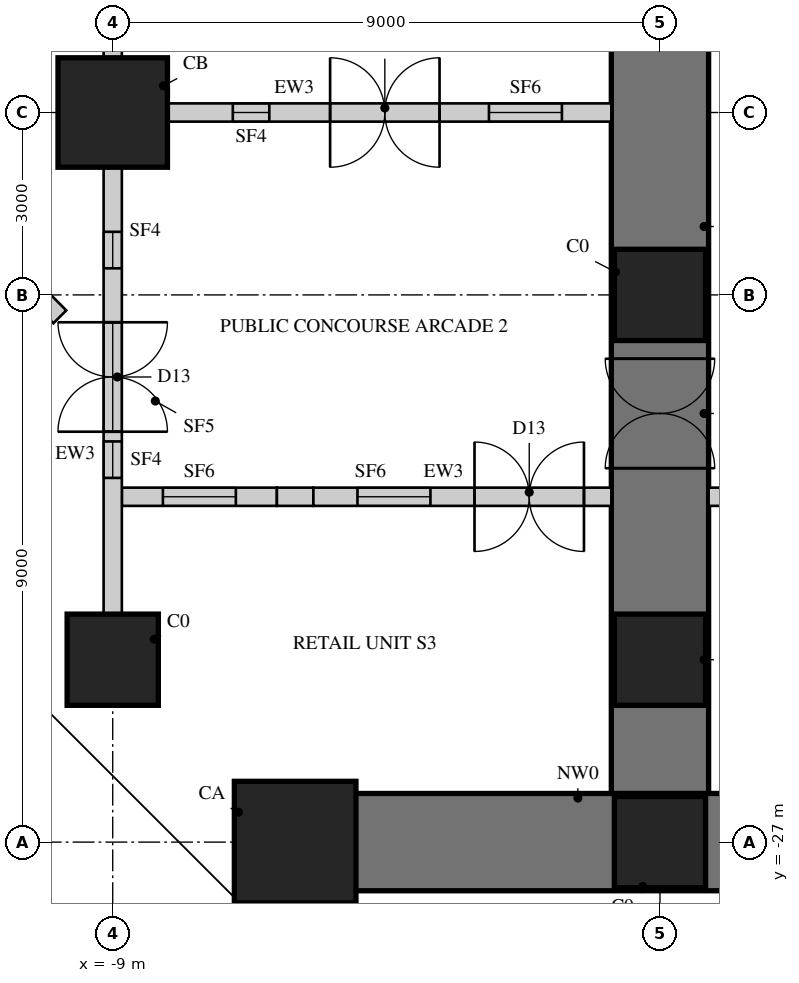
"""IFC4 building model, lengths in metres.
Left out: names, types, materials, properties, quantities, classifications, styles, units other than length and angle.
Written with IfcOpenShell. Run it as: python <this file> out.ifc"""

import sys

from ifc_helpers import new_model, si_unit, direction, frame, frame_2d, origin, origin_2d, place, context, subcontext, project, spatial, rectangle, hollow_rectangle, extrude, element, fill, save


model = new_model("IFC4")
c1 = context("Model", 3, precision=1e-05, world=origin(), true_north=direction((0.0, 1.0)))
c2 = subcontext(c1, "Body", "Model", "MODEL_VIEW")
j1 = project(units=[si_unit("LENGTHUNIT", "METRE"), si_unit("PLANEANGLEUNIT", "RADIAN")], contexts=[c1])
p1 = place(None, origin())
s1 = spatial("IfcSite", under=j1, at=p1, CompositionType="ELEMENT")
p2 = place(p1, origin())
s2 = spatial("IfcBuilding", under=s1, at=p2, CompositionType="ELEMENT")
p3 = place(p2, origin())
s3 = spatial("IfcBuildingStorey", under=s2, at=p3, CompositionType="ELEMENT", Elevation=0.0)
p4 = place(p3, frame((0.0, -9.0, 0.0), z_axis=(0.0, 0.0, 1.0), x_axis=(0.0, -1.0, 0.0)))
e1 = element("IfcWall", 1, at=p4, inside=s3, PredefinedType="SHEAR", context=c2, shape_type="SweptSolid", body=[
    extrude(rectangle(XDim=18.0, YDim=1.6, at=frame_2d((9.0, 0.0))), origin(), (0.0, 0.0, 1.0), 5.0),
])
p5 = place(p4, frame((10.05, 0.0, 0.0)))
e2 = element("IfcOpeningElement", 2, at=p5, cuts=e1, PredefinedType="OPENING", context=c2, shape_type="SweptSolid", body=[
    extrude(rectangle(XDim=1.8, YDim=2.4, at=frame_2d((0.9, 1.2))), frame((0.0, 0.81, 0.0), z_axis=(0.0, -1.0, 0.0), x_axis=(1.0, 0.0, 0.0)), (0.0, 0.0, 1.0), 1.62),
])
p6 = place(p3, frame((-6.0, -27.0, 0.0), z_axis=(0.0, 0.0, 1.0), x_axis=(1.0, 0.0, 0.0)))
e3 = element("IfcWall", 3, at=p6, inside=s3, PredefinedType="SHEAR", context=c2, shape_type="SweptSolid", body=[
    extrude(rectangle(XDim=12.0, YDim=1.6, at=frame_2d((6.0, 0.0))), origin(), (0.0, 0.0, 1.0), 5.0),
])
p7 = place(p3, frame((-9.0, -15.0, 0.0), z_axis=(0.0, 0.0, 1.0), x_axis=(1.0, 0.0, 0.0)))
e4 = element("IfcColumn", 4, at=p7, inside=s3, PredefinedType="COLUMN", context=c2, shape_type="SweptSolid", body=[
    extrude(rectangle(XDim=1.8, YDim=1.8, at=origin_2d()), origin(), (0.0, 0.0, 1.0), 5.0),
])
p8 = place(p3, frame((-9.0, -24.0, 0.0), z_axis=(0.0, 0.0, 1.0), x_axis=(1.0, 0.0, 0.0)))
e5 = element("IfcColumn", 5, at=p8, inside=s3, PredefinedType="COLUMN", context=c2, shape_type="SweptSolid", body=[
    extrude(rectangle(XDim=1.5, YDim=1.5, at=origin_2d()), origin(), (0.0, 0.0, 1.0), 5.0),
])
p9 = place(p3, frame((-6.0, -27.0, 0.0), z_axis=(0.0, 0.0, 1.0), x_axis=(1.0, 0.0, 0.0)))
e6 = element("IfcColumn", 6, at=p9, inside=s3, PredefinedType="COLUMN", context=c2, shape_type="SweptSolid", body=[
    extrude(rectangle(XDim=2.0, YDim=2.0, at=origin_2d()), origin(), (0.0, 0.0, 1.0), 5.0),
])
for number, where, z_axis, x_axis in (
    (7, (0.0, -27.0, 0.0), (0.0, 0.0, 1.0), (1.0, 0.0, 0.0)),
    (8, (0.0, -18.0, 0.0), (0.0, 0.0, 1.0), (1.0, 0.0, 0.0)),
    (9, (0.0, -24.0, 0.0), (0.0, 0.0, 1.0), (1.0, 0.0, 0.0)),
):
    element("IfcColumn", number, at=place(p3, frame(where, z_axis=z_axis, x_axis=x_axis)), inside=s3, PredefinedType="COLUMN", context=c2, shape_type="SweptSolid", body=[
        extrude(rectangle(XDim=1.5, YDim=1.5, at=origin_2d()), origin(), (0.0, 0.0, 1.0), 5.0),
    ])
p10 = place(p3, frame((-18.36, -9.87, 0.0), z_axis=(0.0, 0.0, 1.0), x_axis=(0.707106781187, -0.707106781187, 0.0)))
e10 = element("IfcWall", 10, at=p10, inside=s3, PredefinedType="SOLIDWALL", context=c2, shape_type="SweptSolid", body=[
    extrude(rectangle(XDim=12.007, YDim=0.3, at=frame_2d((6.003, 0.0))), origin(), (0.0, 0.0, 1.0), 4.8),
])
p11 = place(p10, frame((1.034, 0.0, 0.3)))
e11 = element("IfcOpeningElement", 11, at=p11, cuts=e10, PredefinedType="OPENING", context=c2, shape_type="SweptSolid", body=[
    extrude(rectangle(XDim=3.6, YDim=3.9, at=frame_2d((1.8, 1.95))), frame((0.0, 0.16, 0.0), z_axis=(0.0, -1.0, 0.0), x_axis=(1.0, 0.0, 0.0)), (0.0, 0.0, 1.0), 0.32),
])
p12 = place(p10, frame((8.523, 0.0, 0.3)))
e12 = element("IfcOpeningElement", 12, at=p12, cuts=e10, PredefinedType="OPENING", context=c2, shape_type="SweptSolid", body=[
    extrude(rectangle(XDim=2.4, YDim=3.9, at=frame_2d((1.2, 1.95))), frame((0.0, 0.16, 0.0), z_axis=(0.0, -1.0, 0.0), x_axis=(1.0, 0.0, 0.0)), (0.0, 0.0, 1.0), 0.32),
])
p13 = place(p3, frame((-8.25, -15.0, 0.0), z_axis=(0.0, 0.0, 1.0), x_axis=(1.0, 0.0, 0.0)))
e13 = element("IfcWall", 13, at=p13, inside=s3, PredefinedType="SOLIDWALL", context=c2, shape_type="SweptSolid", body=[
    extrude(rectangle(XDim=7.45, YDim=0.3, at=frame_2d((3.725, 0.0))), origin(), (0.0, 0.0, 1.0), 3.85),
])
p14 = place(p13, frame((2.825, 0.0, 0.0)))
e14 = element("IfcOpeningElement", 14, at=p14, cuts=e13, PredefinedType="OPENING", context=c2, shape_type="SweptSolid", body=[
    extrude(rectangle(XDim=1.8, YDim=2.4, at=frame_2d((0.9, 1.2))), frame((0.0, 0.16, 0.0), z_axis=(0.0, -1.0, 0.0), x_axis=(1.0, 0.0, 0.0)), (0.0, 0.0, 1.0), 0.32),
])
p15 = place(p13, frame((1.225, 0.0, 0.3)))
e15 = element("IfcOpeningElement", 15, at=p15, cuts=e13, PredefinedType="OPENING", context=c2, shape_type="SweptSolid", body=[
    extrude(rectangle(XDim=0.6, YDim=3.4, at=frame_2d((0.3, 1.7))), frame((0.0, 0.16, 0.0), z_axis=(0.0, -1.0, 0.0), x_axis=(1.0, 0.0, 0.0)), (0.0, 0.0, 1.0), 0.32),
])
p16 = place(p13, frame((5.438, 0.0, 0.3)))
e16 = element("IfcOpeningElement", 16, at=p16, cuts=e13, PredefinedType="OPENING", context=c2, shape_type="SweptSolid", body=[
    extrude(rectangle(XDim=1.2, YDim=3.4, at=frame_2d((0.6, 1.7))), frame((0.0, 0.16, 0.0), z_axis=(0.0, -1.0, 0.0), x_axis=(1.0, 0.0, 0.0)), (0.0, 0.0, 1.0), 0.32),
])
p17 = place(p3, frame((0.8, -21.32, 0.0), z_axis=(0.0, 0.0, 1.0), x_axis=(1.0, 0.0, 0.0)))
e17 = element("IfcWall", 17, at=p17, inside=s3, PredefinedType="SOLIDWALL", context=c2, shape_type="SweptSolid", body=[
    extrude(rectangle(XDim=4.9, YDim=0.3, at=frame_2d((2.45, 0.0))), origin(), (0.0, 0.0, 1.0), 3.85),
])
p18 = place(p17, frame((0.45, 0.0, 0.0)))
e18 = element("IfcOpeningElement", 18, at=p18, cuts=e17, PredefinedType="OPENING", context=c2, shape_type="SweptSolid", body=[
    extrude(rectangle(XDim=1.8, YDim=2.4, at=frame_2d((0.9, 1.2))), frame((0.0, 0.16, 0.0), z_axis=(0.0, -1.0, 0.0), x_axis=(1.0, 0.0, 0.0)), (0.0, 0.0, 1.0), 0.32),
])
p19 = place(p17, frame((2.975, 0.0, 0.3)))
e19 = element("IfcOpeningElement", 19, at=p19, cuts=e17, PredefinedType="OPENING", context=c2, shape_type="SweptSolid", body=[
    extrude(rectangle(XDim=1.2, YDim=3.4, at=frame_2d((0.6, 1.7))), frame((0.0, 0.16, 0.0), z_axis=(0.0, -1.0, 0.0), x_axis=(1.0, 0.0, 0.0)), (0.0, 0.0, 1.0), 0.32),
])
p20 = place(p3, frame((-8.85, -21.32, 0.0), z_axis=(0.0, 0.0, 1.0), x_axis=(1.0, 0.0, 0.0)))
e20 = element("IfcWall", 20, at=p20, inside=s3, PredefinedType="SOLIDWALL", context=c2, shape_type="SweptSolid", body=[
    extrude(rectangle(XDim=2.55, YDim=0.3, at=frame_2d((1.275, 0.0))), origin(), (0.0, 0.0, 1.0), 3.85),
])
p21 = place(p20, frame((0.675, 0.0, 0.3)))
e21 = element("IfcOpeningElement", 21, at=p21, cuts=e20, PredefinedType="OPENING", context=c2, shape_type="SweptSolid", body=[
    extrude(rectangle(XDim=1.2, YDim=3.4, at=frame_2d((0.6, 1.7))), frame((0.0, 0.16, 0.0), z_axis=(0.0, -1.0, 0.0), x_axis=(1.0, 0.0, 0.0)), (0.0, 0.0, 1.0), 0.32),
])
p22 = place(p3, frame((-6.3, -21.32, 0.0), z_axis=(0.0, 0.0, 1.0), x_axis=(1.0, 0.0, 0.0)))
e22 = element("IfcWall", 22, at=p22, inside=s3, PredefinedType="SOLIDWALL", context=c2, shape_type="SweptSolid", body=[
    extrude(rectangle(XDim=0.6, YDim=0.3, at=frame_2d((0.3, 0.0))), origin(), (0.0, 0.0, 1.0), 4.8),
])
p23 = place(p3, frame((-5.7, -21.32, 0.0), z_axis=(0.0, 0.0, 1.0), x_axis=(1.0, 0.0, 0.0)))
e23 = element("IfcWall", 23, at=p23, inside=s3, PredefinedType="SOLIDWALL", context=c2, shape_type="SweptSolid", body=[
    extrude(rectangle(XDim=4.9, YDim=0.3, at=frame_2d((2.45, 0.0))), origin(), (0.0, 0.0, 1.0), 3.85),
])
p24 = place(p23, frame((2.65, 0.0, 0.0)))
e24 = element("IfcOpeningElement", 24, at=p24, cuts=e23, PredefinedType="OPENING", context=c2, shape_type="SweptSolid", body=[
    extrude(rectangle(XDim=1.8, YDim=2.4, at=frame_2d((0.9, 1.2))), frame((0.0, 0.16, 0.0), z_axis=(0.0, -1.0, 0.0), x_axis=(1.0, 0.0, 0.0)), (0.0, 0.0, 1.0), 0.32),
])
p25 = place(p23, frame((0.725, 0.0, 0.3)))
e25 = element("IfcOpeningElement", 25, at=p25, cuts=e23, PredefinedType="OPENING", context=c2, shape_type="SweptSolid", body=[
    extrude(rectangle(XDim=1.2, YDim=3.4, at=frame_2d((0.6, 1.7))), frame((0.0, 0.16, 0.0), z_axis=(0.0, -1.0, 0.0), x_axis=(1.0, 0.0, 0.0)), (0.0, 0.0, 1.0), 0.32),
])
p26 = place(p3, frame((-9.723, -10.18, 0.0), z_axis=(0.0, 0.0, 1.0), x_axis=(-0.522582491182, -0.852588728468, 0.0)))
e26 = element("IfcWall", 26, at=p26, inside=s3, PredefinedType="PARTITIONING", context=c2, shape_type="SweptSolid", body=[
    extrude(rectangle(XDim=5.884, YDim=0.15, at=frame_2d((2.942, 0.0))), origin(), (0.0, 0.0, 1.0), 4.8),
])
p27 = place(p26, frame((0.016, 0.0, 0.0)))
e27 = element("IfcOpeningElement", 27, at=p27, cuts=e26, PredefinedType="OPENING", context=c2, shape_type="SweptSolid", body=[
    extrude(rectangle(XDim=1.0, YDim=2.2, at=frame_2d((0.5, 1.1))), frame((0.0, 0.085, 0.0), z_axis=(0.0, -1.0, 0.0), x_axis=(1.0, 0.0, 0.0)), (0.0, 0.0, 1.0), 0.17),
])
p28 = place(p3, frame((-9.0, -14.25, 0.0), z_axis=(0.0, 0.0, 1.0), x_axis=(0.0, 1.0, 0.0)))
e28 = element("IfcWall", 28, at=p28, inside=s3, PredefinedType="SOLIDWALL", context=c2, shape_type="SweptSolid", body=[
    extrude(rectangle(XDim=4.6, YDim=0.3, at=frame_2d((2.3, 0.0))), origin(), (0.0, 0.0, 1.0), 3.8),
])
p29 = place(p28, frame((1.2, 0.0, 0.0)))
e29 = element("IfcOpeningElement", 29, at=p29, cuts=e28, PredefinedType="OPENING", context=c2, shape_type="SweptSolid", body=[
    extrude(rectangle(XDim=1.8, YDim=2.4, at=frame_2d((0.9, 1.2))), frame((0.0, 0.16, 0.0), z_axis=(0.0, -1.0, 0.0), x_axis=(1.0, 0.0, 0.0)), (0.0, 0.0, 1.0), 0.32),
])
p30 = place(p3, frame((-9.0, -23.25, 0.0), z_axis=(0.0, 0.0, 1.0), x_axis=(0.0, 1.0, 0.0)))
e30 = element("IfcWall", 30, at=p30, inside=s3, PredefinedType="SOLIDWALL", context=c2, shape_type="SweptSolid", body=[
    extrude(rectangle(XDim=7.5, YDim=0.3, at=frame_2d((3.75, 0.0))), origin(), (0.0, 0.0, 1.0), 3.8),
])
p31 = place(p30, frame((3.0, 0.0, 0.0)))
e31 = element("IfcOpeningElement", 31, at=p31, cuts=e30, PredefinedType="OPENING", context=c2, shape_type="SweptSolid", body=[
    extrude(rectangle(XDim=1.8, YDim=2.4, at=frame_2d((0.9, 1.2))), frame((0.0, 0.16, 0.0), z_axis=(0.0, -1.0, 0.0), x_axis=(1.0, 0.0, 0.0)), (0.0, 0.0, 1.0), 0.32),
])
p32 = place(p30, frame((2.24, 0.0, 0.3)))
e32 = element("IfcOpeningElement", 32, at=p32, cuts=e30, PredefinedType="OPENING", context=c2, shape_type="SweptSolid", body=[
    extrude(rectangle(XDim=0.6, YDim=3.4, at=frame_2d((0.3, 1.7))), frame((0.0, 0.16, 0.0), z_axis=(0.0, -1.0, 0.0), x_axis=(1.0, 0.0, 0.0)), (0.0, 0.0, 1.0), 0.32),
])
p33 = place(p30, frame((5.688, 0.0, 0.3)))
e33 = element("IfcOpeningElement", 33, at=p33, cuts=e30, PredefinedType="OPENING", context=c2, shape_type="SweptSolid", body=[
    extrude(rectangle(XDim=0.6, YDim=3.4, at=frame_2d((0.3, 1.7))), frame((0.0, 0.16, 0.0), z_axis=(0.0, -1.0, 0.0), x_axis=(1.0, 0.0, 0.0)), (0.0, 0.0, 1.0), 0.32),
])
p34 = place(p30, frame((3.0, 0.0, 2.6)))
e34 = element("IfcOpeningElement", 34, at=p34, cuts=e30, PredefinedType="OPENING", context=c2, shape_type="SweptSolid", body=[
    extrude(rectangle(XDim=1.8, YDim=1.1, at=frame_2d((0.9, 0.55))), frame((0.0, 0.16, 0.0), z_axis=(0.0, -1.0, 0.0), x_axis=(1.0, 0.0, 0.0)), (0.0, 0.0, 1.0), 0.32),
])
p35 = place(p14, origin())
e35 = element("IfcDoor", 35, at=p35, inside=s3, OperationType="DOUBLE_DOOR_DOUBLE_SWING", PredefinedType="DOOR", context=c2, shape_type="SweptSolid", body=[
    extrude(hollow_rectangle(XDim=1.8, YDim=2.4, WallThickness=0.06, at=frame_2d((0.9, 1.2))), frame((0.0, 0.025, 0.0), z_axis=(0.0, -1.0, 0.0), x_axis=(1.0, 0.0, 0.0)), (0.0, 0.0, 1.0), 0.05),
    extrude(rectangle(XDim=1.679, YDim=2.279, at=frame_2d((0.9, 1.2))), frame((0.0, 0.025, 0.0), z_axis=(0.0, -1.0, 0.0), x_axis=(1.0, 0.0, 0.0)), (0.0, 0.0, 1.0), 0.05),
])
fill(e14, e35)
p36 = place(p15, origin())
e36 = element("IfcWindow", 36, at=p36, inside=s3, PartitioningType="SINGLE_PANEL", PredefinedType="WINDOW", context=c2, shape_type="SweptSolid", body=[
    extrude(hollow_rectangle(XDim=0.6, YDim=3.4, WallThickness=0.06, at=frame_2d((0.3, 1.7))), frame((0.0, 0.03, 0.0), z_axis=(0.0, -1.0, 0.0), x_axis=(1.0, 0.0, 0.0)), (0.0, 0.0, 1.0), 0.06),
    extrude(rectangle(XDim=0.479, YDim=3.279, at=frame_2d((0.3, 1.7))), frame((0.0, 0.03, 0.0), z_axis=(0.0, -1.0, 0.0), x_axis=(1.0, 0.0, 0.0)), (0.0, 0.0, 1.0), 0.06),
])
fill(e15, e36)
p37 = place(p16, origin())
e37 = element("IfcWindow", 37, at=p37, inside=s3, PartitioningType="SINGLE_PANEL", PredefinedType="WINDOW", context=c2, shape_type="SweptSolid", body=[
    extrude(hollow_rectangle(XDim=1.2, YDim=3.4, WallThickness=0.06, at=frame_2d((0.6, 1.7))), frame((0.0, 0.03, 0.0), z_axis=(0.0, -1.0, 0.0), x_axis=(1.0, 0.0, 0.0)), (0.0, 0.0, 1.0), 0.06),
    extrude(rectangle(XDim=1.079, YDim=3.279, at=frame_2d((0.6, 1.7))), frame((0.0, 0.03, 0.0), z_axis=(0.0, -1.0, 0.0), x_axis=(1.0, 0.0, 0.0)), (0.0, 0.0, 1.0), 0.06),
])
fill(e16, e37)
p38 = place(p24, origin())
e38 = element("IfcDoor", 38, at=p38, inside=s3, OperationType="DOUBLE_DOOR_DOUBLE_SWING", PredefinedType="DOOR", context=c2, shape_type="SweptSolid", body=[
    extrude(hollow_rectangle(XDim=1.8, YDim=2.4, WallThickness=0.06, at=frame_2d((0.9, 1.2))), frame((0.0, 0.025, 0.0), z_axis=(0.0, -1.0, 0.0), x_axis=(1.0, 0.0, 0.0)), (0.0, 0.0, 1.0), 0.05),
    extrude(rectangle(XDim=1.679, YDim=2.279, at=frame_2d((0.9, 1.2))), frame((0.0, 0.025, 0.0), z_axis=(0.0, -1.0, 0.0), x_axis=(1.0, 0.0, 0.0)), (0.0, 0.0, 1.0), 0.05),
])
fill(e24, e38)
p39 = place(p21, origin())
e39 = element("IfcWindow", 39, at=p39, inside=s3, PartitioningType="SINGLE_PANEL", PredefinedType="WINDOW", context=c2, shape_type="SweptSolid", body=[
    extrude(hollow_rectangle(XDim=1.2, YDim=3.4, WallThickness=0.06, at=frame_2d((0.6, 1.7))), frame((0.0, 0.03, 0.0), z_axis=(0.0, -1.0, 0.0), x_axis=(1.0, 0.0, 0.0)), (0.0, 0.0, 1.0), 0.06),
    extrude(rectangle(XDim=1.079, YDim=3.279, at=frame_2d((0.6, 1.7))), frame((0.0, 0.03, 0.0), z_axis=(0.0, -1.0, 0.0), x_axis=(1.0, 0.0, 0.0)), (0.0, 0.0, 1.0), 0.06),
])
fill(e21, e39)
p40 = place(p25, origin())
e40 = element("IfcWindow", 40, at=p40, inside=s3, PartitioningType="SINGLE_PANEL", PredefinedType="WINDOW", context=c2, shape_type="SweptSolid", body=[
    extrude(hollow_rectangle(XDim=1.2, YDim=3.4, WallThickness=0.06, at=frame_2d((0.6, 1.7))), frame((0.0, 0.03, 0.0), z_axis=(0.0, -1.0, 0.0), x_axis=(1.0, 0.0, 0.0)), (0.0, 0.0, 1.0), 0.06),
    extrude(rectangle(XDim=1.079, YDim=3.279, at=frame_2d((0.6, 1.7))), frame((0.0, 0.03, 0.0), z_axis=(0.0, -1.0, 0.0), x_axis=(1.0, 0.0, 0.0)), (0.0, 0.0, 1.0), 0.06),
])
fill(e25, e40)
p41 = place(p31, origin())
e41 = element("IfcDoor", 41, at=p41, inside=s3, OperationType="DOUBLE_DOOR_DOUBLE_SWING", PredefinedType="DOOR", context=c2, shape_type="SweptSolid", body=[
    extrude(hollow_rectangle(XDim=1.8, YDim=2.4, WallThickness=0.06, at=frame_2d((0.9, 1.2))), frame((0.0, 0.025, 0.0), z_axis=(0.0, -1.0, 0.0), x_axis=(1.0, 0.0, 0.0)), (0.0, 0.0, 1.0), 0.05),
    extrude(rectangle(XDim=1.679, YDim=2.279, at=frame_2d((0.9, 1.2))), frame((0.0, 0.025, 0.0), z_axis=(0.0, -1.0, 0.0), x_axis=(1.0, 0.0, 0.0)), (0.0, 0.0, 1.0), 0.05),
])
fill(e31, e41)
p42 = place(p32, origin())
e42 = element("IfcWindow", 42, at=p42, inside=s3, PartitioningType="SINGLE_PANEL", PredefinedType="WINDOW", context=c2, shape_type="SweptSolid", body=[
    extrude(hollow_rectangle(XDim=0.6, YDim=3.4, WallThickness=0.06, at=frame_2d((0.3, 1.7))), frame((0.0, 0.03, 0.0), z_axis=(0.0, -1.0, 0.0), x_axis=(1.0, 0.0, 0.0)), (0.0, 0.0, 1.0), 0.06),
    extrude(rectangle(XDim=0.479, YDim=3.279, at=frame_2d((0.3, 1.7))), frame((0.0, 0.03, 0.0), z_axis=(0.0, -1.0, 0.0), x_axis=(1.0, 0.0, 0.0)), (0.0, 0.0, 1.0), 0.06),
])
fill(e32, e42)
p43 = place(p33, origin())
e43 = element("IfcWindow", 43, at=p43, inside=s3, PartitioningType="SINGLE_PANEL", PredefinedType="WINDOW", context=c2, shape_type="SweptSolid", body=[
    extrude(hollow_rectangle(XDim=0.6, YDim=3.4, WallThickness=0.06, at=frame_2d((0.3, 1.7))), frame((0.0, 0.03, 0.0), z_axis=(0.0, -1.0, 0.0), x_axis=(1.0, 0.0, 0.0)), (0.0, 0.0, 1.0), 0.06),
    extrude(rectangle(XDim=0.479, YDim=3.279, at=frame_2d((0.3, 1.7))), frame((0.0, 0.03, 0.0), z_axis=(0.0, -1.0, 0.0), x_axis=(1.0, 0.0, 0.0)), (0.0, 0.0, 1.0), 0.06),
])
fill(e33, e43)
p44 = place(p34, origin())
e44 = element("IfcWindow", 44, at=p44, inside=s3, PartitioningType="SINGLE_PANEL", PredefinedType="WINDOW", context=c2, shape_type="SweptSolid", body=[
    extrude(hollow_rectangle(XDim=1.8, YDim=1.1, WallThickness=0.06, at=frame_2d((0.9, 0.55))), frame((0.0, 0.03, 0.0), z_axis=(0.0, -1.0, 0.0), x_axis=(1.0, 0.0, 0.0)), (0.0, 0.0, 1.0), 0.06),
    extrude(rectangle(XDim=1.679, YDim=0.979, at=frame_2d((0.9, 0.55))), frame((0.0, 0.03, 0.0), z_axis=(0.0, -1.0, 0.0), x_axis=(1.0, 0.0, 0.0)), (0.0, 0.0, 1.0), 0.06),
])
fill(e34, e44)
p45 = place(p5, origin())
e45 = element("IfcDoor", 45, at=p45, inside=s3, OperationType="DOUBLE_DOOR_DOUBLE_SWING", PredefinedType="DOOR", context=c2, shape_type="SweptSolid", body=[
    extrude(hollow_rectangle(XDim=1.8, YDim=2.4, WallThickness=0.06, at=frame_2d((0.9, 1.2))), frame((0.0, 0.025, 0.0), z_axis=(0.0, -1.0, 0.0), x_axis=(1.0, 0.0, 0.0)), (0.0, 0.0, 1.0), 0.05),
    extrude(rectangle(XDim=1.679, YDim=2.279, at=frame_2d((0.9, 1.2))), frame((0.0, 0.025, 0.0), z_axis=(0.0, -1.0, 0.0), x_axis=(1.0, 0.0, 0.0)), (0.0, 0.0, 1.0), 0.05),
])
fill(e2, e45)
save(model, sys.argv[1])
